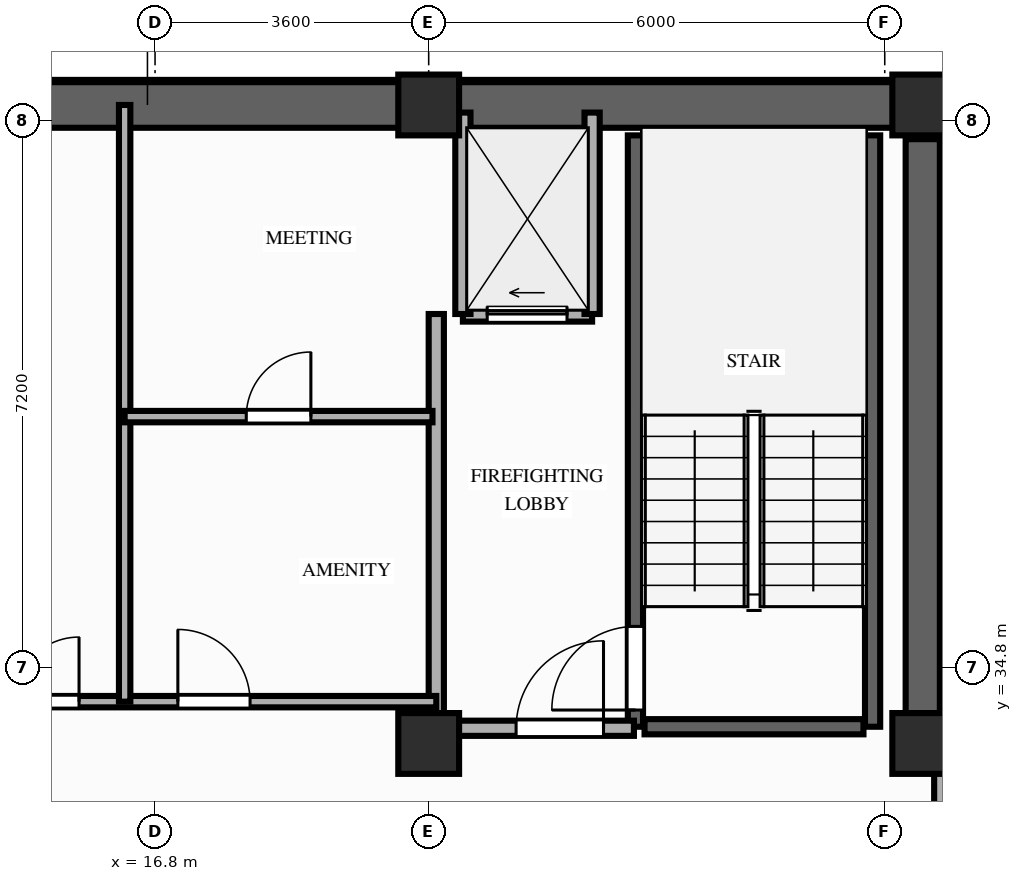
"""IFC4 building model, lengths in metres.
Left out: names, types, materials, properties, quantities, classifications, styles, units other than length and angle.
Written with IfcOpenShell. Run it as: python <this file> out.ifc"""

import sys

from ifc_helpers import new_model, si_unit, direction, frame, frame_2d, origin, origin_2d, place, context, subcontext, project, spatial, rectangle, extrude, element, fill, save


model = new_model("IFC4")
c1 = context("Model", 3, precision=1e-05, world=origin(), true_north=direction((0.0, 1.0)))
c2 = subcontext(c1, "Body", "Model", "MODEL_VIEW")
j1 = project(units=[si_unit("LENGTHUNIT", "METRE"), si_unit("PLANEANGLEUNIT", "RADIAN")], contexts=[c1])
p1 = place(None, origin())
s1 = spatial("IfcSite", under=j1, at=p1, CompositionType="ELEMENT")
p2 = place(p1, origin())
s2 = spatial("IfcBuilding", under=s1, at=p2, CompositionType="ELEMENT")
p3 = place(p2, frame((0.0, 0.0, 201.6)))
s3 = spatial("IfcBuildingStorey", under=s2, at=p3, CompositionType="ELEMENT", Elevation=201.6)
for number, where, z_axis, x_axis in (
    (1, (20.4, 33.8, 0.0), (0.0, 0.0, 1.0), (1.0, 0.0, 0.0)),
    (2, (26.9, 33.8, 0.0), (0.0, 0.0, 1.0), (1.0, 0.0, 0.0)),
    (3, (20.4, 42.2, 0.0), (0.0, 0.0, 1.0), (1.0, 0.0, 0.0)),
    (4, (26.9, 42.2, 0.0), (0.0, 0.0, 1.0), (1.0, 0.0, 0.0)),
):
    element("IfcColumn", number, at=place(p3, frame(where, z_axis=z_axis, x_axis=x_axis)), inside=s3, PredefinedType="COLUMN", context=c2, shape_type="SweptSolid", body=[
        extrude(rectangle(XDim=0.8, YDim=0.8, at=origin_2d()), origin(), (0.0, 0.0, 1.0), 3.2),
    ])
p4 = place(p3, frame((6.45, 42.2, 0.0), z_axis=(0.0, 0.0, 1.0), x_axis=(1.0, 0.0, 0.0)))
e5 = element("IfcWall", 5, at=p4, inside=s3, PredefinedType="SHEAR", context=c2, shape_type="SweptSolid", body=[
    extrude(rectangle(XDim=20.45, YDim=0.6, at=frame_2d((10.225, 0.0))), origin(), (0.0, 0.0, 1.0), 3.02),
])
p5 = place(p3, frame((26.9, 33.8, 0.0), z_axis=(0.0, 0.0, 1.0), x_axis=(0.0, 1.0, 0.0)))
e6 = element("IfcWall", 6, at=p5, inside=s3, PredefinedType="SHEAR", context=c2, shape_type="SweptSolid", body=[
    extrude(rectangle(XDim=7.95, YDim=0.45, at=frame_2d((3.975, 0.0))), origin(), (0.0, 0.0, 1.0), 3.02),
])
p6 = place(p3, frame((23.12, 34.02, 0.0), z_axis=(0.0, 0.0, 1.0), x_axis=(0.0, 1.0, 0.0)))
e7 = element("IfcWall", 7, at=p6, inside=s3, PredefinedType="SHEAR", context=c2, shape_type="SweptSolid", body=[
    extrude(rectangle(XDim=7.78, YDim=0.2, at=frame_2d((3.89, 0.0))), origin(), (0.0, 0.0, 1.0), 3.02),
])
p7 = place(p6, frame((0.22, 0.0, 0.0)))
e8 = element("IfcOpeningElement", 8, at=p7, cuts=e7, PredefinedType="OPENING", context=c2, shape_type="SweptSolid", body=[
    extrude(rectangle(XDim=1.1, YDim=2.15, at=frame_2d((0.55, 1.075))), frame((0.0, 0.11, 0.0), z_axis=(0.0, -1.0, 0.0), x_axis=(1.0, 0.0, 0.0)), (0.0, 0.0, 1.0), 0.22),
])
p8 = place(p3, frame((26.24, 34.02, 0.0), z_axis=(0.0, 0.0, 1.0), x_axis=(0.0, 1.0, 0.0)))
e9 = element("IfcWall", 9, at=p8, inside=s3, PredefinedType="SHEAR", context=c2, shape_type="SweptSolid", body=[
    extrude(rectangle(XDim=7.78, YDim=0.2, at=frame_2d((3.89, 0.0))), origin(), (0.0, 0.0, 1.0), 3.02),
])
p9 = place(p3, frame((23.24, 34.02, 0.0), z_axis=(0.0, 0.0, 1.0), x_axis=(1.0, 0.0, 0.0)))
e10 = element("IfcWall", 10, at=p9, inside=s3, PredefinedType="SHEAR", context=c2, shape_type="SweptSolid", body=[
    extrude(rectangle(XDim=2.88, YDim=0.2, at=frame_2d((1.44, 0.0))), origin(), (0.0, 0.0, 1.0), 3.02),
])
p10 = place(p3, frame((20.85, 39.45, 0.0), z_axis=(0.0, 0.0, 1.0), x_axis=(1.0, 0.0, 0.0)))
e11 = element("IfcWall", 11, at=p10, inside=s3, PredefinedType="MOVABLE", context=c2, shape_type="SweptSolid", body=[
    extrude(rectangle(XDim=1.7, YDim=0.2, at=frame_2d((0.85, 0.0))), origin(), (0.0, 0.0, 1.0), 3.02),
])
p11 = place(p10, frame((0.32, 0.0, 0.0)))
e12 = element("IfcOpeningElement", 12, at=p11, cuts=e11, PredefinedType="OPENING", context=c2, shape_type="SweptSolid", body=[
    extrude(rectangle(XDim=1.05, YDim=2.15, at=frame_2d((0.525, 1.075))), frame((0.0, 0.11, 0.0), z_axis=(0.0, -1.0, 0.0), x_axis=(1.0, 0.0, 0.0)), (0.0, 0.0, 1.0), 0.22),
])
for number, where, z_axis, x_axis in (
    (13, (20.85, 39.45, 0.0), (0.0, 0.0, 1.0), (0.0, 1.0, 0.0)),
    (14, (22.55, 39.45, 0.0), (0.0, 0.0, 1.0), (0.0, 1.0, 0.0)),
):
    element("IfcWall", number, at=place(p3, frame(where, z_axis=z_axis, x_axis=x_axis)), inside=s3, PredefinedType="MOVABLE", context=c2, shape_type="SweptSolid", body=[
        extrude(rectangle(XDim=2.65, YDim=0.2, at=frame_2d((1.325, 0.0))), origin(), (0.0, 0.0, 1.0), 2.51),
    ])
p12 = place(p3, frame((20.5, 34.0, 0.0), z_axis=(0.0, 0.0, 1.0), x_axis=(0.0, 1.0, 0.0)))
e15 = element("IfcWall", 15, at=p12, inside=s3, PredefinedType="PARTITIONING", context=c2, shape_type="SweptSolid", body=[
    extrude(rectangle(XDim=5.45, YDim=0.2, at=frame_2d((2.725, 0.0))), origin(), (0.0, 0.0, 1.0), 2.51),
])
p13 = place(p3, frame((20.5, 34.0, 0.0), z_axis=(0.0, 0.0, 1.0), x_axis=(1.0, 0.0, 0.0)))
e16 = element("IfcWall", 16, at=p13, inside=s3, PredefinedType="PARTITIONING", context=c2, shape_type="SweptSolid", body=[
    extrude(rectangle(XDim=2.6, YDim=0.2, at=frame_2d((1.3, 0.0))), origin(), (0.0, 0.0, 1.0), 2.51),
])
p14 = place(p13, frame((1.05, 0.0, 0.0)))
e17 = element("IfcOpeningElement", 17, at=p14, cuts=e16, PredefinedType="OPENING", context=c2, shape_type="SweptSolid", body=[
    extrude(rectangle(XDim=1.15, YDim=2.15, at=frame_2d((0.575, 1.075))), frame((0.0, 0.11, 0.0), z_axis=(0.0, -1.0, 0.0), x_axis=(1.0, 0.0, 0.0)), (0.0, 0.0, 1.0), 0.22),
])
p15 = place(p3, frame((12.9, 34.35, 0.0), z_axis=(0.0, 0.0, 1.0), x_axis=(1.0, 0.0, 0.0)))
e18 = element("IfcWall", 18, at=p15, inside=s3, PredefinedType="PARTITIONING", context=c2, shape_type="SweptSolid", body=[
    extrude(rectangle(XDim=7.6, YDim=0.15, at=frame_2d((3.8, 0.0))), origin(), (0.0, 0.0, 1.0), 3.02),
])
p16 = place(p15, frame((2.05, 0.0, 0.0)))
e19 = element("IfcOpeningElement", 19, at=p16, cuts=e18, PredefinedType="OPENING", context=c2, shape_type="SweptSolid", body=[
    extrude(rectangle(XDim=0.85, YDim=2.05, at=frame_2d((0.425, 1.025))), frame((0.0, 0.085, 0.0), z_axis=(0.0, -1.0, 0.0), x_axis=(1.0, 0.0, 0.0)), (0.0, 0.0, 1.0), 0.17),
])
p17 = place(p15, frame((4.2, 0.0, 0.0)))
e20 = element("IfcOpeningElement", 20, at=p17, cuts=e18, PredefinedType="OPENING", context=c2, shape_type="SweptSolid", body=[
    extrude(rectangle(XDim=0.95, YDim=2.15, at=frame_2d((0.475, 1.075))), frame((0.0, 0.085, 0.0), z_axis=(0.0, -1.0, 0.0), x_axis=(1.0, 0.0, 0.0)), (0.0, 0.0, 1.0), 0.17),
])
p18 = place(p3, frame((16.4, 34.35, 0.0), z_axis=(0.0, 0.0, 1.0), x_axis=(0.0, 1.0, 0.0)))
e21 = element("IfcWall", 21, at=p18, inside=s3, PredefinedType="PARTITIONING", context=c2, shape_type="SweptSolid", body=[
    extrude(rectangle(XDim=7.85, YDim=0.15, at=frame_2d((3.925, 0.0))), origin(), (0.0, 0.0, 1.0), 2.51),
])
p19 = place(p3, frame((16.4, 38.1, 0.0), z_axis=(0.0, 0.0, 1.0), x_axis=(1.0, 0.0, 0.0)))
e22 = element("IfcWall", 22, at=p19, inside=s3, PredefinedType="PARTITIONING", context=c2, shape_type="SweptSolid", body=[
    extrude(rectangle(XDim=4.05, YDim=0.15, at=frame_2d((2.025, 0.0))), origin(), (0.0, 0.0, 1.0), 3.02),
])
p20 = place(p19, frame((1.6, 0.0, 0.0)))
e23 = element("IfcOpeningElement", 23, at=p20, cuts=e22, PredefinedType="OPENING", context=c2, shape_type="SweptSolid", body=[
    extrude(rectangle(XDim=0.85, YDim=2.05, at=frame_2d((0.425, 1.025))), frame((0.0, 0.085, 0.0), z_axis=(0.0, -1.0, 0.0), x_axis=(1.0, 0.0, 0.0)), (0.0, 0.0, 1.0), 0.17),
])
p21 = place(p3, frame((27.15, 32.6, 0.0), z_axis=(0.0, 0.0, 1.0), x_axis=(0.0, 1.0, 0.0)))
e24 = element("IfcWall", 24, at=p21, inside=s3, PredefinedType="PARTITIONING", context=c2, shape_type="SweptSolid", body=[
    extrude(rectangle(XDim=1.08, YDim=0.2, at=frame_2d((0.54, 0.0))), origin(), (0.0, 0.0, 1.0), 2.51),
])
p22 = place(p7, origin())
e25 = element("IfcDoor", 25, at=p22, inside=s3, OperationType="SINGLE_SWING_LEFT", PredefinedType="DOOR", context=c2, shape_type="SweptSolid", body=[
    extrude(rectangle(XDim=1.1, YDim=2.15, at=frame_2d((0.55, 1.075))), frame((0.0, 0.025, 0.0), z_axis=(0.0, -1.0, 0.0), x_axis=(1.0, 0.0, 0.0)), (0.0, 0.0, 1.0), 0.05),
])
fill(e8, e25)
p23 = place(p11, origin())
e26 = element("IfcDoor", 26, at=p23, inside=s3, OperationType="SLIDING_TO_LEFT", PredefinedType="DOOR", context=c2, shape_type="SweptSolid", body=[
    extrude(rectangle(XDim=1.05, YDim=2.15, at=frame_2d((0.525, 1.075))), frame((0.0, 0.025, 0.0), z_axis=(0.0, -1.0, 0.0), x_axis=(1.0, 0.0, 0.0)), (0.0, 0.0, 1.0), 0.05),
])
fill(e12, e26)
p24 = place(p14, origin())
e27 = element("IfcDoor", 27, at=p24, inside=s3, OperationType="SINGLE_SWING_RIGHT", PredefinedType="DOOR", context=c2, shape_type="SweptSolid", body=[
    extrude(rectangle(XDim=1.15, YDim=2.15, at=frame_2d((0.575, 1.075))), frame((0.0, 0.025, 0.0), z_axis=(0.0, -1.0, 0.0), x_axis=(1.0, 0.0, 0.0)), (0.0, 0.0, 1.0), 0.05),
])
fill(e17, e27)
p25 = place(p16, origin())
e28 = element("IfcDoor", 28, at=p25, inside=s3, OperationType="SINGLE_SWING_RIGHT", PredefinedType="DOOR", context=c2, shape_type="SweptSolid", body=[
    extrude(rectangle(XDim=0.85, YDim=2.05, at=frame_2d((0.425, 1.025))), frame((0.0, 0.025, 0.0), z_axis=(0.0, -1.0, 0.0), x_axis=(1.0, 0.0, 0.0)), (0.0, 0.0, 1.0), 0.05),
])
fill(e19, e28)
p26 = place(p17, origin())
e29 = element("IfcDoor", 29, at=p26, inside=s3, OperationType="SINGLE_SWING_LEFT", PredefinedType="DOOR", context=c2, shape_type="SweptSolid", body=[
    extrude(rectangle(XDim=0.95, YDim=2.15, at=frame_2d((0.475, 1.075))), frame((0.0, 0.025, 0.0), z_axis=(0.0, -1.0, 0.0), x_axis=(1.0, 0.0, 0.0)), (0.0, 0.0, 1.0), 0.05),
])
fill(e20, e29)
p27 = place(p20, origin())
e30 = element("IfcDoor", 30, at=p27, inside=s3, OperationType="SINGLE_SWING_RIGHT", PredefinedType="DOOR", context=c2, shape_type="SweptSolid", body=[
    extrude(rectangle(XDim=0.85, YDim=2.05, at=frame_2d((0.425, 1.025))), frame((0.0, 0.025, 0.0), z_axis=(0.0, -1.0, 0.0), x_axis=(1.0, 0.0, 0.0)), (0.0, 0.0, 1.0), 0.05),
])
fill(e23, e30)
save(model, sys.argv[1])
